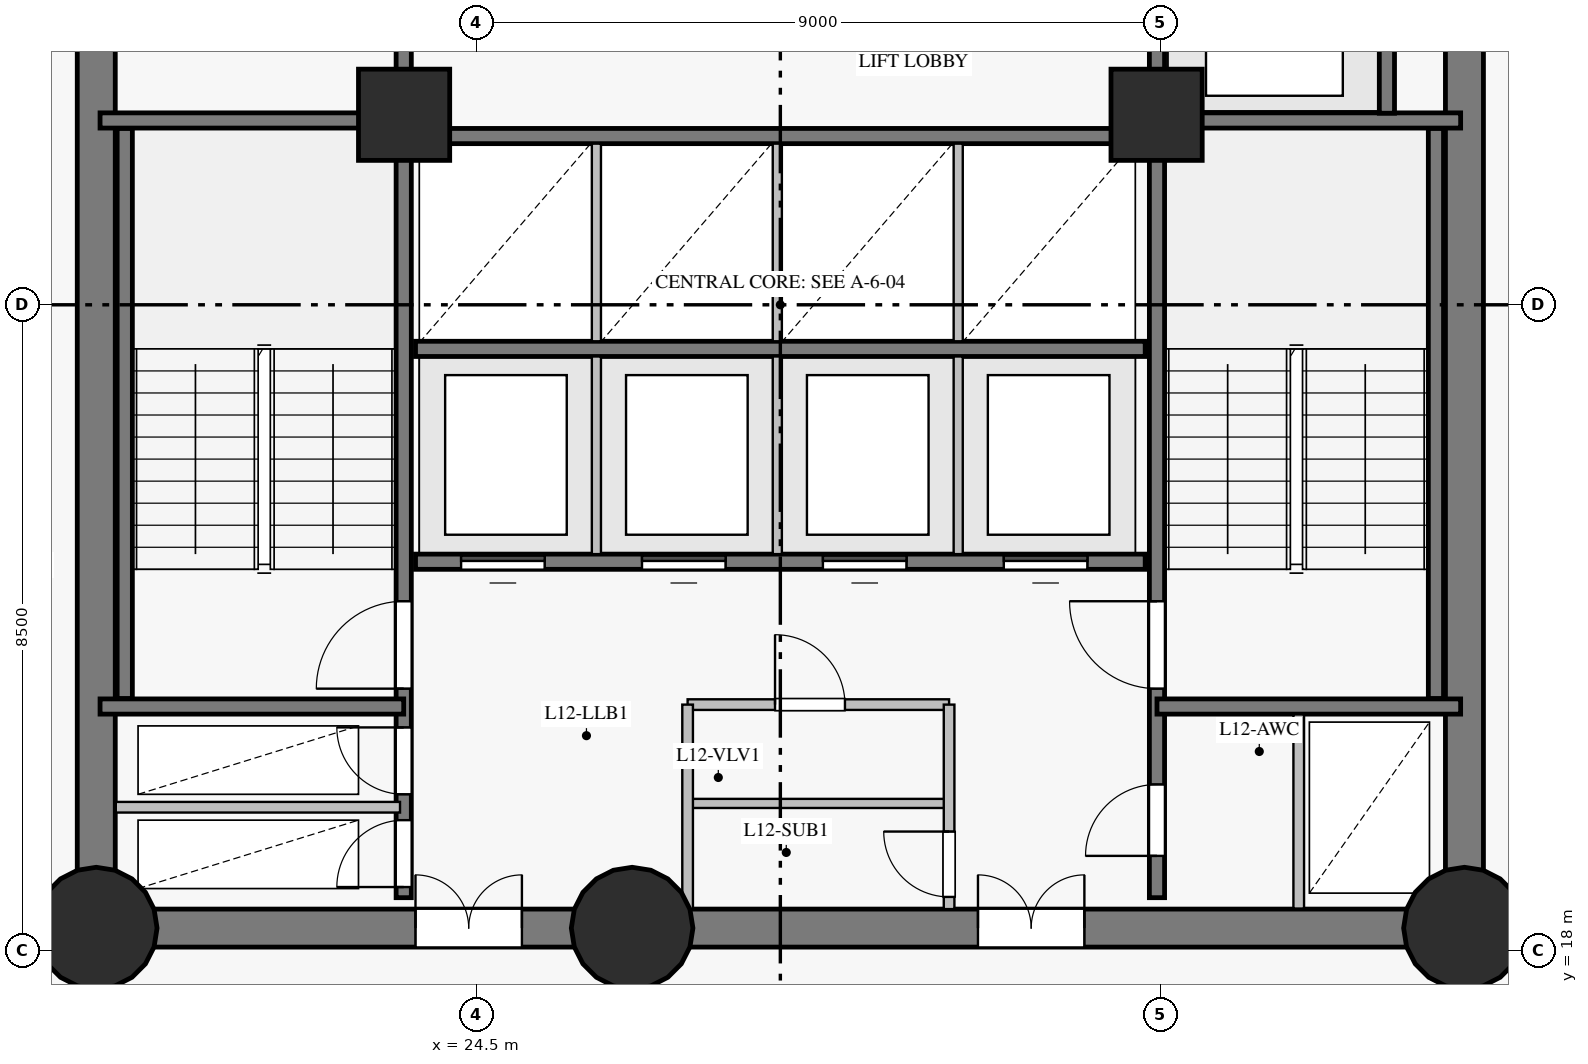
"""IFC4 building model, lengths in metres.
Left out: names, types, materials, properties, quantities, classifications, styles, units other than length and angle.
Written with IfcOpenShell. Run it as: python <this file> out.ifc"""

import sys

from ifc_helpers import new_model, si_unit, direction, frame, frame_2d, origin, origin_with_axes, origin_2d, place, context, subcontext, project, spatial, rectangle, circle, extrude, source, transform, mapped, element, fill, save


model = new_model("IFC4")
c1 = context("Model", 3, precision=1e-05, world=origin(), true_north=direction((0.0, 1.0)))
c2 = subcontext(c1, "Body", "Model", "MODEL_VIEW")
j1 = project(units=[si_unit("LENGTHUNIT", "METRE"), si_unit("PLANEANGLEUNIT", "RADIAN")], contexts=[c1])
p1 = place(None, origin())
s1 = spatial("IfcSite", under=j1, at=p1, CompositionType="ELEMENT")
p2 = place(p1, origin())
s2 = spatial("IfcBuilding", under=s1, at=p2, CompositionType="ELEMENT")
p3 = place(p2, frame((0.0, 0.0, 48.1)))
s3 = spatial("IfcBuildingStorey", under=s2, at=p3, CompositionType="ELEMENT", Elevation=48.1)
p4 = place(p3, frame((19.5, 18.3, 0.0), z_axis=(0.0, 0.0, 1.0), x_axis=(1.0, 0.0, 0.0)))
e1 = element("IfcWall", 1, at=p4, inside=s3, PredefinedType="SHEAR", context=c2, shape_type="SweptSolid", body=[
    extrude(rectangle(XDim=7.05, YDim=0.5, at=frame_2d((3.525, 0.0))), origin(), (0.0, 0.0, 1.0), 3.35),
])
p5 = place(p4, frame((4.2, 0.0, 0.0)))
e2 = element("IfcOpeningElement", 2, at=p5, cuts=e1, PredefinedType="OPENING", context=c2, shape_type="SweptSolid", body=[
    extrude(rectangle(XDim=1.4, YDim=2.2, at=frame_2d((0.7, 1.1))), frame((0.0, 0.26, 0.0), z_axis=(0.0, -1.0, 0.0), x_axis=(1.0, 0.0, 0.0)), (0.0, 0.0, 1.0), 0.52),
])
p6 = place(p3, frame((26.55, 18.3, 0.0), z_axis=(0.0, 0.0, 1.0), x_axis=(1.0, 0.0, 0.0)))
e3 = element("IfcWall", 3, at=p6, inside=s3, PredefinedType="SHEAR", context=c2, shape_type="SweptSolid", body=[
    extrude(rectangle(XDim=10.95, YDim=0.5, at=frame_2d((5.475, 0.0))), origin(), (0.0, 0.0, 1.0), 3.35),
])
p7 = place(p6, frame((4.55, 0.0, 0.0)))
e4 = element("IfcOpeningElement", 4, at=p7, cuts=e3, PredefinedType="OPENING", context=c2, shape_type="SweptSolid", body=[
    extrude(rectangle(XDim=1.4, YDim=2.2, at=frame_2d((0.7, 1.1))), frame((0.0, 0.26, 0.0), z_axis=(0.0, -1.0, 0.0), x_axis=(1.0, 0.0, 0.0)), (0.0, 0.0, 1.0), 0.52),
])
p8 = place(p3, frame((37.5, 18.3, 0.0), z_axis=(0.0, 0.0, 1.0), x_axis=(0.0, 1.0, 0.0)))
e5 = element("IfcWall", 5, at=p8, inside=s3, PredefinedType="SHEAR", context=c2, shape_type="SweptSolid", body=[
    extrude(rectangle(XDim=16.4, YDim=0.5, at=frame_2d((8.2, 0.0))), origin(), (0.0, 0.0, 1.0), 3.35),
])
p9 = place(p8, frame((14.06, 0.0, 0.0)))
e6 = element("IfcOpeningElement", 6, at=p9, cuts=e5, PredefinedType="OPENING", context=c2, shape_type="SweptSolid", body=[
    extrude(rectangle(XDim=1.2, YDim=2.15, at=frame_2d((0.6, 1.075))), frame((0.0, 0.26, 0.0), z_axis=(0.0, -1.0, 0.0), x_axis=(1.0, 0.0, 0.0)), (0.0, 0.0, 1.0), 0.52),
])
p10 = place(p3, frame((19.5, 34.7, 0.0), z_axis=(0.0, 0.0, 1.0), x_axis=(0.0, -1.0, 0.0)))
e7 = element("IfcWall", 7, at=p10, inside=s3, PredefinedType="SHEAR", context=c2, shape_type="SweptSolid", body=[
    extrude(rectangle(XDim=16.4, YDim=0.5, at=frame_2d((8.2, 0.0))), origin(), (0.0, 0.0, 1.0), 3.35),
])
p11 = place(p10, frame((3.1, 0.0, 0.0)))
e8 = element("IfcOpeningElement", 8, at=p11, cuts=e7, PredefinedType="OPENING", context=c2, shape_type="SweptSolid", body=[
    extrude(rectangle(XDim=1.1, YDim=2.15, at=frame_2d((0.55, 1.075))), frame((0.0, 0.26, 0.0), z_axis=(0.0, -1.0, 0.0), x_axis=(1.0, 0.0, 0.0)), (0.0, 0.0, 1.0), 0.52),
])
m1 = source(origin_with_axes(), c2, "Body", "SweptSolid", [
    extrude(circle(Radius=0.8, at=origin_2d()), origin(), (0.0, 0.0, 1.0), 3.6),
])
for number, where, z_axis, x_axis in (
    (9, (19.5, 18.3, 0.0), (0.0, 0.0, 1.0), (1.0, 0.0, 0.0)),
    (10, (26.55, 18.3, 0.0), (0.0, 0.0, 1.0), (1.0, 0.0, 0.0)),
    (11, (37.5, 18.3, 0.0), (0.0, 0.0, 1.0), (1.0, 0.0, 0.0)),
):
    element("IfcColumn", number, at=place(p3, frame(where, z_axis=z_axis, x_axis=x_axis)), inside=s3, PredefinedType="COLUMN", context=c2, shape_type="MappedRepresentation", body=[
        mapped(m1, transform((0.0, 0.0, 0.0), scale=1.0)),
    ])
m2 = source(origin_with_axes(), c2, "Body", "SweptSolid", [
    extrude(rectangle(XDim=1.2, YDim=1.2, at=origin_2d()), origin(), (0.0, 0.0, 1.0), 3.6),
])
for number, where, z_axis, x_axis in (
    (12, (23.55, 29.0, 0.0), (0.0, 0.0, 1.0), (1.0, 0.0, 0.0)),
    (13, (33.45, 29.0, 0.0), (0.0, 0.0, 1.0), (1.0, 0.0, 0.0)),
):
    element("IfcColumn", number, at=place(p3, frame(where, z_axis=z_axis, x_axis=x_axis)), inside=s3, PredefinedType="COLUMN", context=c2, shape_type="MappedRepresentation", body=[
        mapped(m2, transform((0.0, 0.0, 0.0), scale=1.0)),
    ])
p12 = place(p3, frame((23.545, 18.7, 0.0), z_axis=(0.0, 0.0, 1.0), x_axis=(0.0, 1.0, 0.0)))
e14 = element("IfcWall", 14, at=p12, inside=s3, PredefinedType="SHEAR", context=c2, shape_type="SweptSolid", body=[
    extrude(rectangle(XDim=15.6, YDim=0.2, at=frame_2d((7.8, 0.0))), origin(), (0.0, 0.0, 1.0), 3.35),
])
p13 = place(p12, frame((2.75, 0.0, 0.0)))
e15 = element("IfcOpeningElement", 15, at=p13, cuts=e14, PredefinedType="OPENING", context=c2, shape_type="SweptSolid", body=[
    extrude(rectangle(XDim=1.15, YDim=2.15, at=frame_2d((0.575, 1.075))), frame((0.0, 0.11, 0.0), z_axis=(0.0, -1.0, 0.0), x_axis=(1.0, 0.0, 0.0)), (0.0, 0.0, 1.0), 0.22),
])
p14 = place(p12, frame((0.14, 0.0, 0.0)))
e16 = element("IfcOpeningElement", 16, at=p14, cuts=e14, PredefinedType="OPENING", context=c2, shape_type="SweptSolid", body=[
    extrude(rectangle(XDim=0.88, YDim=2.1, at=frame_2d((0.44, 1.05))), frame((0.0, 0.11, 0.0), z_axis=(0.0, -1.0, 0.0), x_axis=(1.0, 0.0, 0.0)), (0.0, 0.0, 1.0), 0.22),
])
p15 = place(p12, frame((1.36, 0.0, 0.0)))
e17 = element("IfcOpeningElement", 17, at=p15, cuts=e14, PredefinedType="OPENING", context=c2, shape_type="SweptSolid", body=[
    extrude(rectangle(XDim=0.88, YDim=2.1, at=frame_2d((0.44, 1.05))), frame((0.0, 0.11, 0.0), z_axis=(0.0, -1.0, 0.0), x_axis=(1.0, 0.0, 0.0)), (0.0, 0.0, 1.0), 0.22),
])
p16 = place(p12, frame((12.1, 0.0, 0.0)))
e18 = element("IfcOpeningElement", 18, at=p16, cuts=e14, PredefinedType="OPENING", context=c2, shape_type="SweptSolid", body=[
    extrude(rectangle(XDim=1.12, YDim=2.15, at=frame_2d((0.56, 1.075))), frame((0.0, 0.11, 0.0), z_axis=(0.0, -1.0, 0.0), x_axis=(1.0, 0.0, 0.0)), (0.0, 0.0, 1.0), 0.22),
])
p17 = place(p12, frame((14.05, 0.0, 0.0)))
e19 = element("IfcOpeningElement", 19, at=p17, cuts=e14, PredefinedType="OPENING", context=c2, shape_type="SweptSolid", body=[
    extrude(rectangle(XDim=1.12, YDim=2.15, at=frame_2d((0.56, 1.075))), frame((0.0, 0.11, 0.0), z_axis=(0.0, -1.0, 0.0), x_axis=(1.0, 0.0, 0.0)), (0.0, 0.0, 1.0), 0.22),
])
p18 = place(p3, frame((33.455, 18.7, 0.0), z_axis=(0.0, 0.0, 1.0), x_axis=(0.0, 1.0, 0.0)))
e20 = element("IfcWall", 20, at=p18, inside=s3, PredefinedType="SHEAR", context=c2, shape_type="SweptSolid", body=[
    extrude(rectangle(XDim=15.6, YDim=0.2, at=frame_2d((7.8, 0.0))), origin(), (0.0, 0.0, 1.0), 3.35),
])
p19 = place(p18, frame((2.75, 0.0, 0.0)))
e21 = element("IfcOpeningElement", 21, at=p19, cuts=e20, PredefinedType="OPENING", context=c2, shape_type="SweptSolid", body=[
    extrude(rectangle(XDim=1.15, YDim=2.15, at=frame_2d((0.575, 1.075))), frame((0.0, 0.11, 0.0), z_axis=(0.0, -1.0, 0.0), x_axis=(1.0, 0.0, 0.0)), (0.0, 0.0, 1.0), 0.22),
])
p20 = place(p18, frame((0.55, 0.0, 0.0)))
e22 = element("IfcOpeningElement", 22, at=p20, cuts=e20, PredefinedType="OPENING", context=c2, shape_type="SweptSolid", body=[
    extrude(rectangle(XDim=0.94, YDim=2.1, at=frame_2d((0.47, 1.05))), frame((0.0, 0.11, 0.0), z_axis=(0.0, -1.0, 0.0), x_axis=(1.0, 0.0, 0.0)), (0.0, 0.0, 1.0), 0.22),
])
p21 = place(p3, frame((23.7, 23.12, 0.0), z_axis=(0.0, 0.0, 1.0), x_axis=(1.0, 0.0, 0.0)))
e23 = element("IfcWall", 23, at=p21, inside=s3, PredefinedType="SHEAR", context=c2, shape_type="SweptSolid", body=[
    extrude(rectangle(XDim=9.6, YDim=0.2, at=frame_2d((4.8, 0.0))), origin(), (0.0, 0.0, 1.0), 3.35),
])
p22 = place(p21, frame((0.6, 0.0, 0.0)))
e24 = element("IfcOpeningElement", 24, at=p22, cuts=e23, PredefinedType="OPENING", context=c2, shape_type="SweptSolid", body=[
    extrude(rectangle(XDim=1.1, YDim=2.15, at=frame_2d((0.55, 1.075))), frame((0.0, 0.11, 0.0), z_axis=(0.0, -1.0, 0.0), x_axis=(1.0, 0.0, 0.0)), (0.0, 0.0, 1.0), 0.22),
])
p23 = place(p21, frame((2.98, 0.0, 0.0)))
e25 = element("IfcOpeningElement", 25, at=p23, cuts=e23, PredefinedType="OPENING", context=c2, shape_type="SweptSolid", body=[
    extrude(rectangle(XDim=1.1, YDim=2.15, at=frame_2d((0.55, 1.075))), frame((0.0, 0.11, 0.0), z_axis=(0.0, -1.0, 0.0), x_axis=(1.0, 0.0, 0.0)), (0.0, 0.0, 1.0), 0.22),
])
p24 = place(p21, frame((5.36, 0.0, 0.0)))
e26 = element("IfcOpeningElement", 26, at=p24, cuts=e23, PredefinedType="OPENING", context=c2, shape_type="SweptSolid", body=[
    extrude(rectangle(XDim=1.1, YDim=2.15, at=frame_2d((0.55, 1.075))), frame((0.0, 0.11, 0.0), z_axis=(0.0, -1.0, 0.0), x_axis=(1.0, 0.0, 0.0)), (0.0, 0.0, 1.0), 0.22),
])
p25 = place(p21, frame((7.74, 0.0, 0.0)))
e27 = element("IfcOpeningElement", 27, at=p25, cuts=e23, PredefinedType="OPENING", context=c2, shape_type="SweptSolid", body=[
    extrude(rectangle(XDim=1.1, YDim=2.15, at=frame_2d((0.55, 1.075))), frame((0.0, 0.11, 0.0), z_axis=(0.0, -1.0, 0.0), x_axis=(1.0, 0.0, 0.0)), (0.0, 0.0, 1.0), 0.22),
])
for number, where, z_axis, x_axis in (
    (28, (23.7, 25.92, 0.0), (0.0, 0.0, 1.0), (1.0, 0.0, 0.0)),
    (29, (23.7, 28.72, 0.0), (0.0, 0.0, 1.0), (1.0, 0.0, 0.0)),
):
    element("IfcWall", number, at=place(p3, frame(where, z_axis=z_axis, x_axis=x_axis)), inside=s3, PredefinedType="SHEAR", context=c2, shape_type="SweptSolid", body=[
        extrude(rectangle(XDim=9.6, YDim=0.2, at=frame_2d((4.8, 0.0))), origin(), (0.0, 0.0, 1.0), 3.35),
    ])
for number, where, z_axis, x_axis in (
    (30, (19.875, 21.32, 0.0), (0.0, 0.0, 1.0), (0.0, 1.0, 0.0)),
    (31, (37.125, 21.32, 0.0), (0.0, 0.0, 1.0), (0.0, 1.0, 0.0)),
):
    element("IfcWall", number, at=place(p3, frame(where, z_axis=z_axis, x_axis=x_axis)), inside=s3, PredefinedType="SHEAR", context=c2, shape_type="SweptSolid", body=[
        extrude(rectangle(XDim=7.5, YDim=0.2, at=frame_2d((3.75, 0.0))), origin(), (0.0, 0.0, 1.0), 3.35),
    ])
for number, where, z_axis, x_axis in (
    (32, (33.455, 21.215, 0.0), (0.0, 0.0, 1.0), (1.0, 0.0, 0.0)),
    (33, (33.455, 28.925, 0.0), (0.0, 0.0, 1.0), (1.0, 0.0, 0.0)),
    (34, (19.55, 21.215, 0.0), (0.0, 0.0, 1.0), (1.0, 0.0, 0.0)),
    (35, (19.55, 28.925, 0.0), (0.0, 0.0, 1.0), (1.0, 0.0, 0.0)),
):
    element("IfcWall", number, at=place(p3, frame(where, z_axis=z_axis, x_axis=x_axis)), inside=s3, PredefinedType="SHEAR", context=c2, shape_type="SweptSolid", body=[
        extrude(rectangle(XDim=3.995, YDim=0.2, at=frame_2d((1.998, 0.0))), origin(), (0.0, 0.0, 1.0), 3.35),
    ])
p26 = place(p3, frame((36.48, 29.02, 0.0), z_axis=(0.0, 0.0, 1.0), x_axis=(0.0, 1.0, 0.0)))
e36 = element("IfcWall", 36, at=p26, inside=s3, PredefinedType="SHEAR", context=c2, shape_type="SweptSolid", body=[
    extrude(rectangle(XDim=2.86, YDim=0.2, at=frame_2d((1.43, 0.0))), origin(), (0.0, 0.0, 1.0), 3.35),
])
p27 = place(p3, frame((19.757, 19.89, 0.0), z_axis=(0.0, 0.0, 1.0), x_axis=(1.0, 0.0, 0.0)))
e37 = element("IfcWall", 37, at=p27, inside=s3, PredefinedType="PARTITIONING", context=c2, shape_type="SweptSolid", body=[
    extrude(rectangle(XDim=3.739, YDim=0.14, at=frame_2d((1.87, 0.0))), origin(), (0.0, 0.0, 1.0), 3.35),
])
p28 = place(p3, frame((27.28, 21.24, 0.0), z_axis=(0.0, 0.0, 1.0), x_axis=(1.0, 0.0, 0.0)))
e38 = element("IfcWall", 38, at=p28, inside=s3, PredefinedType="PARTITIONING", context=c2, shape_type="SweptSolid", body=[
    extrude(rectangle(XDim=3.44, YDim=0.14, at=frame_2d((1.72, 0.0))), origin(), (0.0, 0.0, 1.0), 3.35),
])
p29 = place(p28, frame((1.15, 0.0, 0.0)))
e39 = element("IfcOpeningElement", 39, at=p29, cuts=e38, PredefinedType="OPENING", context=c2, shape_type="SweptSolid", body=[
    extrude(rectangle(XDim=0.92, YDim=2.1, at=frame_2d((0.46, 1.05))), frame((0.0, 0.08, 0.0), z_axis=(0.0, -1.0, 0.0), x_axis=(1.0, 0.0, 0.0)), (0.0, 0.0, 1.0), 0.16),
])
p30 = place(p3, frame((27.28, 19.94, 0.0), z_axis=(0.0, 0.0, 1.0), x_axis=(1.0, 0.0, 0.0)))
e40 = element("IfcWall", 40, at=p30, inside=s3, PredefinedType="PARTITIONING", context=c2, shape_type="SweptSolid", body=[
    extrude(rectangle(XDim=3.44, YDim=0.12, at=frame_2d((1.72, 0.0))), origin(), (0.0, 0.0, 1.0), 3.35),
])
p31 = place(p3, frame((27.28, 18.55, 0.0), z_axis=(0.0, 0.0, 1.0), x_axis=(0.0, 1.0, 0.0)))
e41 = element("IfcWall", 41, at=p31, inside=s3, PredefinedType="PARTITIONING", context=c2, shape_type="SweptSolid", body=[
    extrude(rectangle(XDim=2.69, YDim=0.14, at=frame_2d((1.345, 0.0))), origin(), (0.0, 0.0, 1.0), 3.35),
])
p32 = place(p3, frame((30.72, 18.55, 0.0), z_axis=(0.0, 0.0, 1.0), x_axis=(0.0, 1.0, 0.0)))
e42 = element("IfcWall", 42, at=p32, inside=s3, PredefinedType="PARTITIONING", context=c2, shape_type="SweptSolid", body=[
    extrude(rectangle(XDim=2.69, YDim=0.14, at=frame_2d((1.345, 0.0))), origin(), (0.0, 0.0, 1.0), 3.35),
])
p33 = place(p32, frame((0.16, 0.0, 0.0)))
e43 = element("IfcOpeningElement", 43, at=p33, cuts=e42, PredefinedType="OPENING", context=c2, shape_type="SweptSolid", body=[
    extrude(rectangle(XDim=0.86, YDim=2.1, at=frame_2d((0.43, 1.05))), frame((0.0, 0.08, 0.0), z_axis=(0.0, -1.0, 0.0), x_axis=(1.0, 0.0, 0.0)), (0.0, 0.0, 1.0), 0.16),
])
for number, where, z_axis, x_axis in (
    (44, (26.08, 23.22, 0.0), (0.0, 0.0, 1.0), (0.0, 1.0, 0.0)),
    (45, (28.46, 23.22, 0.0), (0.0, 0.0, 1.0), (0.0, 1.0, 0.0)),
    (46, (30.84, 23.22, 0.0), (0.0, 0.0, 1.0), (0.0, 1.0, 0.0)),
    (47, (26.08, 26.02, 0.0), (0.0, 0.0, 1.0), (0.0, 1.0, 0.0)),
    (48, (28.46, 26.02, 0.0), (0.0, 0.0, 1.0), (0.0, 1.0, 0.0)),
    (49, (30.84, 26.02, 0.0), (0.0, 0.0, 1.0), (0.0, 1.0, 0.0)),
):
    element("IfcWall", number, at=place(p3, frame(where, z_axis=z_axis, x_axis=x_axis)), inside=s3, PredefinedType="PARTITIONING", context=c2, shape_type="SweptSolid", body=[
        extrude(rectangle(XDim=2.6, YDim=0.12, at=frame_2d((1.3, 0.0))), origin(), (0.0, 0.0, 1.0), 3.35),
    ])
p34 = place(p3, frame((35.32, 18.557, 0.0), z_axis=(0.0, 0.0, 1.0), x_axis=(0.0, 1.0, 0.0)))
e50 = element("IfcWall", 50, at=p34, inside=s3, PredefinedType="PARTITIONING", context=c2, shape_type="SweptSolid", body=[
    extrude(rectangle(XDim=2.553, YDim=0.14, at=frame_2d((1.277, 0.0))), origin(), (0.0, 0.0, 1.0), 3.35),
])
m3 = source(origin_with_axes(), c2, "Body", "SweptSolid", [
    extrude(rectangle(XDim=1.15, YDim=2.15, at=frame_2d((0.575, 1.075))), frame((0.0, 0.025, 0.0), z_axis=(0.0, -1.0, 0.0), x_axis=(1.0, 0.0, 0.0)), (0.0, 0.0, 1.0), 0.05),
])
p35 = place(p13, origin())
e51 = element("IfcDoor", 51, at=p35, inside=s3, OperationType="SINGLE_SWING_LEFT", PredefinedType="DOOR", context=c2, shape_type="MappedRepresentation", body=[
    mapped(m3, transform((0.0, 0.0, 0.0), scale=1.0)),
])
fill(e15, e51)
p36 = place(p19, origin())
e52 = element("IfcDoor", 52, at=p36, inside=s3, OperationType="SINGLE_SWING_RIGHT", PredefinedType="DOOR", context=c2, shape_type="MappedRepresentation", body=[
    mapped(m3, transform((0.0, 0.0, 0.0), scale=1.0)),
])
fill(e21, e52)
m4 = source(origin_with_axes(), c2, "Body", "SweptSolid", [
    extrude(rectangle(XDim=0.88, YDim=2.1, at=frame_2d((0.44, 1.05))), frame((0.0, 0.025, 0.0), z_axis=(0.0, -1.0, 0.0), x_axis=(1.0, 0.0, 0.0)), (0.0, 0.0, 1.0), 0.05),
])
p37 = place(p14, origin())
e53 = element("IfcDoor", 53, at=p37, inside=s3, OperationType="SINGLE_SWING_LEFT", PredefinedType="DOOR", context=c2, shape_type="MappedRepresentation", body=[
    mapped(m4, transform((0.0, 0.0, 0.0), scale=1.0)),
])
fill(e16, e53)
p38 = place(p15, origin())
e54 = element("IfcDoor", 54, at=p38, inside=s3, OperationType="SINGLE_SWING_RIGHT", PredefinedType="DOOR", context=c2, shape_type="MappedRepresentation", body=[
    mapped(m4, transform((0.0, 0.0, 0.0), scale=1.0)),
])
fill(e17, e54)
m5 = source(origin_with_axes(), c2, "Body", "SweptSolid", [
    extrude(rectangle(XDim=1.4, YDim=2.2, at=frame_2d((0.7, 1.1))), frame((0.0, 0.025, 0.0), z_axis=(0.0, -1.0, 0.0), x_axis=(1.0, 0.0, 0.0)), (0.0, 0.0, 1.0), 0.05),
])
p39 = place(p5, origin())
e55 = element("IfcDoor", 55, at=p39, inside=s3, OperationType="DOUBLE_DOOR_SINGLE_SWING", PredefinedType="DOOR", context=c2, shape_type="MappedRepresentation", body=[
    mapped(m5, transform((0.0, 0.0, 0.0), scale=1.0)),
])
fill(e2, e55)
p40 = place(p7, origin())
e56 = element("IfcDoor", 56, at=p40, inside=s3, OperationType="DOUBLE_DOOR_SINGLE_SWING", PredefinedType="DOOR", context=c2, shape_type="MappedRepresentation", body=[
    mapped(m5, transform((0.0, 0.0, 0.0), scale=1.0)),
])
fill(e4, e56)
m6 = source(origin_with_axes(), c2, "Body", "SweptSolid", [
    extrude(rectangle(XDim=0.94, YDim=2.1, at=frame_2d((0.47, 1.05))), frame((0.0, 0.025, 0.0), z_axis=(0.0, -1.0, 0.0), x_axis=(1.0, 0.0, 0.0)), (0.0, 0.0, 1.0), 0.05),
])
p41 = place(p20, origin())
e57 = element("IfcDoor", 57, at=p41, inside=s3, OperationType="SINGLE_SWING_LEFT", PredefinedType="DOOR", context=c2, shape_type="MappedRepresentation", body=[
    mapped(m6, transform((0.0, 0.0, 0.0), scale=1.0)),
])
fill(e22, e57)
m7 = source(origin_with_axes(), c2, "Body", "SweptSolid", [
    extrude(rectangle(XDim=0.86, YDim=2.1, at=frame_2d((0.43, 1.05))), frame((0.0, 0.025, 0.0), z_axis=(0.0, -1.0, 0.0), x_axis=(1.0, 0.0, 0.0)), (0.0, 0.0, 1.0), 0.05),
])
p42 = place(p33, origin())
e58 = element("IfcDoor", 58, at=p42, inside=s3, OperationType="SINGLE_SWING_RIGHT", PredefinedType="DOOR", context=c2, shape_type="MappedRepresentation", body=[
    mapped(m7, transform((0.0, 0.0, 0.0), scale=1.0)),
])
fill(e43, e58)
m8 = source(origin_with_axes(), c2, "Body", "SweptSolid", [
    extrude(rectangle(XDim=0.92, YDim=2.1, at=frame_2d((0.46, 1.05))), frame((0.0, 0.025, 0.0), z_axis=(0.0, -1.0, 0.0), x_axis=(1.0, 0.0, 0.0)), (0.0, 0.0, 1.0), 0.05),
])
p43 = place(p29, origin())
e59 = element("IfcDoor", 59, at=p43, inside=s3, OperationType="SINGLE_SWING_LEFT", PredefinedType="DOOR", context=c2, shape_type="MappedRepresentation", body=[
    mapped(m8, transform((0.0, 0.0, 0.0), scale=1.0)),
])
fill(e39, e59)
m9 = source(origin_with_axes(), c2, "Body", "SweptSolid", [
    extrude(rectangle(XDim=1.1, YDim=2.15, at=frame_2d((0.55, 1.075))), frame((0.0, 0.025, 0.0), z_axis=(0.0, -1.0, 0.0), x_axis=(1.0, 0.0, 0.0)), (0.0, 0.0, 1.0), 0.05),
])
p44 = place(p22, origin())
e60 = element("IfcDoor", 60, at=p44, inside=s3, OperationType="SLIDING_TO_LEFT", PredefinedType="DOOR", context=c2, shape_type="MappedRepresentation", body=[
    mapped(m9, transform((0.0, 0.0, 0.0), scale=1.0)),
])
fill(e24, e60)
p45 = place(p23, origin())
e61 = element("IfcDoor", 61, at=p45, inside=s3, OperationType="SLIDING_TO_RIGHT", PredefinedType="DOOR", context=c2, shape_type="MappedRepresentation", body=[
    mapped(m9, transform((0.0, 0.0, 0.0), scale=1.0)),
])
fill(e25, e61)
p46 = place(p24, origin())
e62 = element("IfcDoor", 62, at=p46, inside=s3, OperationType="SLIDING_TO_LEFT", PredefinedType="DOOR", context=c2, shape_type="MappedRepresentation", body=[
    mapped(m9, transform((0.0, 0.0, 0.0), scale=1.0)),
])
fill(e26, e62)
p47 = place(p25, origin())
e63 = element("IfcDoor", 63, at=p47, inside=s3, OperationType="SLIDING_TO_RIGHT", PredefinedType="DOOR", context=c2, shape_type="MappedRepresentation", body=[
    mapped(m9, transform((0.0, 0.0, 0.0), scale=1.0)),
])
fill(e27, e63)
save(model, sys.argv[1])
